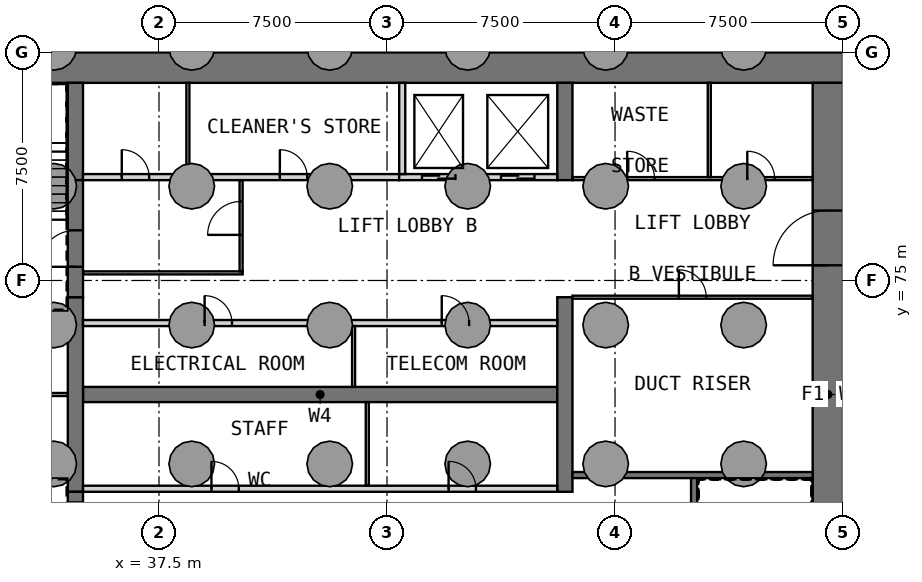
"""IFC4 building model, lengths in metres.
Left out: names, types, materials, properties, quantities, classifications, styles, units other than length and angle.
Written with IfcOpenShell. Run it as: python <this file> out.ifc"""

import sys

from ifc_helpers import new_model, si_unit, direction, frame, frame_2d, origin, place, context, subcontext, project, spatial, rectangle, extrude, element, fill, save


model = new_model("IFC4")
c1 = context("Model", 3, precision=1e-05, world=origin(), true_north=direction((0.0, 1.0)))
c2 = subcontext(c1, "Body", "Model", "MODEL_VIEW")
j1 = project(units=[si_unit("LENGTHUNIT", "METRE"), si_unit("PLANEANGLEUNIT", "RADIAN")], contexts=[c1])
p1 = place(None, origin())
s1 = spatial("IfcSite", under=j1, at=p1, CompositionType="ELEMENT")
p2 = place(p1, origin())
s2 = spatial("IfcBuilding", under=s1, at=p2, CompositionType="ELEMENT")
p3 = place(p2, frame((0.0, 0.0, -12.0)))
s3 = spatial("IfcBuildingStorey", under=s2, at=p3, CompositionType="ELEMENT", Elevation=-12.0)
p4 = place(p3, frame((30.0, 82.0, 0.0), z_axis=(0.0, 0.0, 1.0), x_axis=(1.0, 0.0, 0.0)))
e1 = element("IfcWall", 1, at=p4, inside=s3, PredefinedType="SHEAR", context=c2, shape_type="SweptSolid", body=[
    extrude(rectangle(XDim=30.0, YDim=1.0, at=frame_2d((15.0, 0.0))), origin(), (0.0, 0.0, 1.0), 6.0),
])
p5 = place(p3, frame((59.5, 61.0, 0.0), z_axis=(0.0, 0.0, 1.0), x_axis=(0.0, 1.0, 0.0)))
e2 = element("IfcWall", 2, at=p5, inside=s3, PredefinedType="SHEAR", context=c2, shape_type="SweptSolid", body=[
    extrude(rectangle(XDim=20.5, YDim=1.0, at=frame_2d((10.25, 0.0))), origin(), (0.0, 0.0, 1.0), 6.0),
])
p6 = place(p5, frame((14.5, 0.0, 0.0)))
e3 = element("IfcOpeningElement", 3, at=p6, cuts=e2, PredefinedType="OPENING", context=c2, shape_type="SweptSolid", body=[
    extrude(rectangle(XDim=1.8, YDim=2.1, at=frame_2d((0.9, 1.05))), frame((0.0, 0.51, 0.0), z_axis=(0.0, -1.0, 0.0), x_axis=(1.0, 0.0, 0.0)), (0.0, 0.0, 1.0), 1.02),
])
p7 = place(p3, frame((35.0, 71.25, 0.0), z_axis=(0.0, 0.0, 1.0), x_axis=(1.0, 0.0, 0.0)))
e4 = element("IfcWall", 4, at=p7, inside=s3, PredefinedType="SHEAR", context=c2, shape_type="SweptSolid", body=[
    extrude(rectangle(XDim=15.6, YDim=0.5, at=frame_2d((7.8, 0.0))), origin(), (0.0, 0.0, 1.0), 6.0),
])
p8 = place(p3, frame((34.75, 68.05, 0.0), z_axis=(0.0, 0.0, 1.0), x_axis=(0.0, 1.0, 0.0)))
e5 = element("IfcWall", 5, at=p8, inside=s3, PredefinedType="SHEAR", context=c2, shape_type="SweptSolid", body=[
    extrude(rectangle(XDim=6.4, YDim=0.5, at=frame_2d((3.2, 0.0))), origin(), (0.0, 0.0, 1.0), 6.0),
])
p9 = place(p3, frame((34.75, 78.3, 0.0), z_axis=(0.0, 0.0, 1.0), x_axis=(0.0, 1.0, 0.0)))
e6 = element("IfcWall", 6, at=p9, inside=s3, PredefinedType="SHEAR", context=c2, shape_type="SweptSolid", body=[
    extrude(rectangle(XDim=3.2, YDim=0.5, at=frame_2d((1.6, 0.0))), origin(), (0.0, 0.0, 1.0), 6.0),
])
p10 = place(p3, frame((50.85, 68.05, 0.0), z_axis=(0.0, 0.0, 1.0), x_axis=(0.0, 1.0, 0.0)))
e7 = element("IfcWall", 7, at=p10, inside=s3, PredefinedType="SHEAR", context=c2, shape_type="SweptSolid", body=[
    extrude(rectangle(XDim=6.4, YDim=0.5, at=frame_2d((3.2, 0.0))), origin(), (0.0, 0.0, 1.0), 6.0),
])
p11 = place(p3, frame((50.85, 78.3, 0.0), z_axis=(0.0, 0.0, 1.0), x_axis=(0.0, 1.0, 0.0)))
e8 = element("IfcWall", 8, at=p11, inside=s3, PredefinedType="SHEAR", context=c2, shape_type="SweptSolid", body=[
    extrude(rectangle(XDim=3.2, YDim=0.5, at=frame_2d((1.6, 0.0))), origin(), (0.0, 0.0, 1.0), 6.0),
])
p12 = place(p3, frame((35.0, 68.15, 0.0), z_axis=(0.0, 0.0, 1.0), x_axis=(1.0, 0.0, 0.0)))
e9 = element("IfcWall", 9, at=p12, inside=s3, PredefinedType="PARTITIONING", context=c2, shape_type="SweptSolid", body=[
    extrude(rectangle(XDim=15.6, YDim=0.2, at=frame_2d((7.8, 0.0))), origin(), (0.0, 0.0, 1.0), 5.4),
])
p13 = place(p12, frame((4.225, 0.0, 0.0)))
e10 = element("IfcOpeningElement", 10, at=p13, cuts=e9, PredefinedType="OPENING", context=c2, shape_type="SweptSolid", body=[
    extrude(rectangle(XDim=0.9, YDim=2.1, at=frame_2d((0.45, 1.05))), frame((0.0, 0.11, 0.0), z_axis=(0.0, -1.0, 0.0), x_axis=(1.0, 0.0, 0.0)), (0.0, 0.0, 1.0), 0.22),
])
p14 = place(p12, frame((12.025, 0.0, 0.0)))
e11 = element("IfcOpeningElement", 11, at=p14, cuts=e9, PredefinedType="OPENING", context=c2, shape_type="SweptSolid", body=[
    extrude(rectangle(XDim=0.9, YDim=2.1, at=frame_2d((0.45, 1.05))), frame((0.0, 0.11, 0.0), z_axis=(0.0, -1.0, 0.0), x_axis=(1.0, 0.0, 0.0)), (0.0, 0.0, 1.0), 0.22),
])
p15 = place(p3, frame((44.35, 68.25, 0.0), z_axis=(0.0, 0.0, 1.0), x_axis=(0.0, 1.0, 0.0)))
e12 = element("IfcWall", 12, at=p15, inside=s3, PredefinedType="PARTITIONING", context=c2, shape_type="SweptSolid", body=[
    extrude(rectangle(XDim=2.75, YDim=0.1, at=frame_2d((1.375, 0.0))), origin(), (0.0, 0.0, 1.0), 5.4),
])
p16 = place(p3, frame((35.0, 73.6, 0.0), z_axis=(0.0, 0.0, 1.0), x_axis=(1.0, 0.0, 0.0)))
e13 = element("IfcWall", 13, at=p16, inside=s3, PredefinedType="PARTITIONING", context=c2, shape_type="SweptSolid", body=[
    extrude(rectangle(XDim=15.6, YDim=0.2, at=frame_2d((7.8, 0.0))), origin(), (0.0, 0.0, 1.0), 5.4),
])
p17 = place(p16, frame((4.0, 0.0, 0.0)))
e14 = element("IfcOpeningElement", 14, at=p17, cuts=e13, PredefinedType="OPENING", context=c2, shape_type="SweptSolid", body=[
    extrude(rectangle(XDim=0.9, YDim=2.1, at=frame_2d((0.45, 1.05))), frame((0.0, 0.11, 0.0), z_axis=(0.0, -1.0, 0.0), x_axis=(1.0, 0.0, 0.0)), (0.0, 0.0, 1.0), 0.22),
])
p18 = place(p16, frame((11.8, 0.0, 0.0)))
e15 = element("IfcOpeningElement", 15, at=p18, cuts=e13, PredefinedType="OPENING", context=c2, shape_type="SweptSolid", body=[
    extrude(rectangle(XDim=0.9, YDim=2.1, at=frame_2d((0.45, 1.05))), frame((0.0, 0.11, 0.0), z_axis=(0.0, -1.0, 0.0), x_axis=(1.0, 0.0, 0.0)), (0.0, 0.0, 1.0), 0.22),
])
p19 = place(p3, frame((43.9, 71.5, 0.0), z_axis=(0.0, 0.0, 1.0), x_axis=(0.0, 1.0, 0.0)))
e16 = element("IfcWall", 16, at=p19, inside=s3, PredefinedType="PARTITIONING", context=c2, shape_type="SweptSolid", body=[
    extrude(rectangle(XDim=2.0, YDim=0.1, at=frame_2d((1.0, 0.0))), origin(), (0.0, 0.0, 1.0), 5.4),
])
p20 = place(p3, frame((35.0, 78.4, 0.0), z_axis=(0.0, 0.0, 1.0), x_axis=(1.0, 0.0, 0.0)))
e17 = element("IfcWall", 17, at=p20, inside=s3, PredefinedType="PARTITIONING", context=c2, shape_type="SweptSolid", body=[
    extrude(rectangle(XDim=10.4, YDim=0.2, at=frame_2d((5.2, 0.0))), origin(), (0.0, 0.0, 1.0), 5.4),
])
p21 = place(p20, frame((1.275, 0.0, 0.0)))
e18 = element("IfcOpeningElement", 18, at=p21, cuts=e17, PredefinedType="OPENING", context=c2, shape_type="SweptSolid", body=[
    extrude(rectangle(XDim=0.9, YDim=2.1, at=frame_2d((0.45, 1.05))), frame((0.0, 0.11, 0.0), z_axis=(0.0, -1.0, 0.0), x_axis=(1.0, 0.0, 0.0)), (0.0, 0.0, 1.0), 0.22),
])
p22 = place(p20, frame((6.475, 0.0, 0.0)))
e19 = element("IfcOpeningElement", 19, at=p22, cuts=e17, PredefinedType="OPENING", context=c2, shape_type="SweptSolid", body=[
    extrude(rectangle(XDim=0.9, YDim=2.1, at=frame_2d((0.45, 1.05))), frame((0.0, 0.11, 0.0), z_axis=(0.0, -1.0, 0.0), x_axis=(1.0, 0.0, 0.0)), (0.0, 0.0, 1.0), 0.22),
])
p23 = place(p3, frame((38.45, 78.5, 0.0), z_axis=(0.0, 0.0, 1.0), x_axis=(0.0, 1.0, 0.0)))
e20 = element("IfcWall", 20, at=p23, inside=s3, PredefinedType="PARTITIONING", context=c2, shape_type="SweptSolid", body=[
    extrude(rectangle(XDim=3.0, YDim=0.1, at=frame_2d((1.5, 0.0))), origin(), (0.0, 0.0, 1.0), 5.4),
])
p24 = place(p3, frame((45.4, 78.4, 0.0), z_axis=(0.0, 0.0, 1.0), x_axis=(1.0, 0.0, 0.0)))
e21 = element("IfcWall", 21, at=p24, inside=s3, PredefinedType="SOLIDWALL", context=c2, shape_type="SweptSolid", body=[
    extrude(rectangle(XDim=5.2, YDim=0.2, at=frame_2d((2.6, 0.0))), origin(), (0.0, 0.0, 1.0), 6.0),
])
p25 = place(p24, frame((0.75, 0.0, 0.0)))
e22 = element("IfcOpeningElement", 22, at=p25, cuts=e21, PredefinedType="OPENING", context=c2, shape_type="SweptSolid", body=[
    extrude(rectangle(XDim=1.1, YDim=2.1, at=frame_2d((0.55, 1.05))), frame((0.0, 0.11, 0.0), z_axis=(0.0, -1.0, 0.0), x_axis=(1.0, 0.0, 0.0)), (0.0, 0.0, 1.0), 0.22),
])
p26 = place(p24, frame((3.35, 0.0, 0.0)))
e23 = element("IfcOpeningElement", 23, at=p26, cuts=e21, PredefinedType="OPENING", context=c2, shape_type="SweptSolid", body=[
    extrude(rectangle(XDim=1.1, YDim=2.1, at=frame_2d((0.55, 1.05))), frame((0.0, 0.11, 0.0), z_axis=(0.0, -1.0, 0.0), x_axis=(1.0, 0.0, 0.0)), (0.0, 0.0, 1.0), 0.22),
])
p27 = place(p3, frame((45.5, 78.5, 0.0), z_axis=(0.0, 0.0, 1.0), x_axis=(0.0, 1.0, 0.0)))
e24 = element("IfcWall", 24, at=p27, inside=s3, PredefinedType="SOLIDWALL", context=c2, shape_type="SweptSolid", body=[
    extrude(rectangle(XDim=3.0, YDim=0.2, at=frame_2d((1.5, 0.0))), origin(), (0.0, 0.0, 1.0), 6.0),
])
p28 = place(p3, frame((35.0, 75.25, 0.0), z_axis=(0.0, 0.0, 1.0), x_axis=(1.0, 0.0, 0.0)))
e25 = element("IfcWall", 25, at=p28, inside=s3, PredefinedType="PARTITIONING", context=c2, shape_type="SweptSolid", body=[
    extrude(rectangle(XDim=5.25, YDim=0.1, at=frame_2d((2.625, 0.0))), origin(), (0.0, 0.0, 1.0), 5.4),
])
p29 = place(p3, frame((40.2, 75.3, 0.0), z_axis=(0.0, 0.0, 1.0), x_axis=(0.0, 1.0, 0.0)))
e26 = element("IfcWall", 26, at=p29, inside=s3, PredefinedType="PARTITIONING", context=c2, shape_type="SweptSolid", body=[
    extrude(rectangle(XDim=3.0, YDim=0.1, at=frame_2d((1.5, 0.0))), origin(), (0.0, 0.0, 1.0), 5.4),
])
p30 = place(p29, frame((1.2, 0.0, 0.0)))
e27 = element("IfcOpeningElement", 27, at=p30, cuts=e26, PredefinedType="OPENING", context=c2, shape_type="SweptSolid", body=[
    extrude(rectangle(XDim=1.1, YDim=2.1, at=frame_2d((0.55, 1.05))), frame((0.0, 0.06, 0.0), z_axis=(0.0, -1.0, 0.0), x_axis=(1.0, 0.0, 0.0)), (0.0, 0.0, 1.0), 0.12),
])
p31 = place(p3, frame((34.75, 64.2, 0.0), z_axis=(0.0, 0.0, 1.0), x_axis=(0.0, 1.0, 0.0)))
e28 = element("IfcWall", 28, at=p31, inside=s3, PredefinedType="SOLIDWALL", context=c2, shape_type="SweptSolid", body=[
    extrude(rectangle(XDim=3.85, YDim=0.5, at=frame_2d((1.925, 0.0))), origin(), (0.0, 0.0, 1.0), 4.8),
])
p32 = place(p31, frame((2.3, 0.0, 0.0)))
e29 = element("IfcOpeningElement", 29, at=p32, cuts=e28, PredefinedType="OPENING", context=c2, shape_type="SweptSolid", body=[
    extrude(rectangle(XDim=1.2, YDim=2.1, at=frame_2d((0.6, 1.05))), frame((0.0, 0.26, 0.0), z_axis=(0.0, -1.0, 0.0), x_axis=(1.0, 0.0, 0.0)), (0.0, 0.0, 1.0), 0.52),
])
p33 = place(p3, frame((34.75, 74.45, 0.0), z_axis=(0.0, 0.0, 1.0), x_axis=(0.0, 1.0, 0.0)))
e30 = element("IfcWall", 30, at=p33, inside=s3, PredefinedType="SOLIDWALL", context=c2, shape_type="SweptSolid", body=[
    extrude(rectangle(XDim=3.85, YDim=0.5, at=frame_2d((1.925, 0.0))), origin(), (0.0, 0.0, 1.0), 4.8),
])
p34 = place(p33, frame((1.0, 0.0, 0.0)))
e31 = element("IfcOpeningElement", 31, at=p34, cuts=e30, PredefinedType="OPENING", context=c2, shape_type="SweptSolid", body=[
    extrude(rectangle(XDim=1.2, YDim=2.1, at=frame_2d((0.6, 1.05))), frame((0.0, 0.26, 0.0), z_axis=(0.0, -1.0, 0.0), x_axis=(1.0, 0.0, 0.0)), (0.0, 0.0, 1.0), 0.52),
])
p35 = place(p3, frame((31.0, 68.6, 0.0), z_axis=(0.0, 0.0, 1.0), x_axis=(1.0, 0.0, 0.0)))
e32 = element("IfcWall", 32, at=p35, inside=s3, PredefinedType="SOLIDWALL", context=c2, shape_type="SweptSolid", body=[
    extrude(rectangle(XDim=3.5, YDim=0.2, at=frame_2d((1.75, 0.0))), origin(), (0.0, 0.0, 1.0), 5.4),
])
p36 = place(p35, frame((1.3, 0.0, 0.0)))
e33 = element("IfcOpeningElement", 33, at=p36, cuts=e32, PredefinedType="OPENING", context=c2, shape_type="SweptSolid", body=[
    extrude(rectangle(XDim=0.9, YDim=2.1, at=frame_2d((0.45, 1.05))), frame((0.0, 0.11, 0.0), z_axis=(0.0, -1.0, 0.0), x_axis=(1.0, 0.0, 0.0)), (0.0, 0.0, 1.0), 0.22),
])
p37 = place(p3, frame((31.0, 73.9, 0.0), z_axis=(0.0, 0.0, 1.0), x_axis=(1.0, 0.0, 0.0)))
e34 = element("IfcWall", 34, at=p37, inside=s3, PredefinedType="SOLIDWALL", context=c2, shape_type="SweptSolid", body=[
    extrude(rectangle(XDim=3.5, YDim=0.2, at=frame_2d((1.75, 0.0))), origin(), (0.0, 0.0, 1.0), 5.4),
])
p38 = place(p37, frame((1.3, 0.0, 0.0)))
e35 = element("IfcOpeningElement", 35, at=p38, cuts=e34, PredefinedType="OPENING", context=c2, shape_type="SweptSolid", body=[
    extrude(rectangle(XDim=0.9, YDim=2.1, at=frame_2d((0.45, 1.05))), frame((0.0, 0.11, 0.0), z_axis=(0.0, -1.0, 0.0), x_axis=(1.0, 0.0, 0.0)), (0.0, 0.0, 1.0), 0.22),
])
p39 = place(p3, frame((55.1, 61.0, 0.0), z_axis=(0.0, 0.0, 1.0), x_axis=(0.0, 1.0, 0.0)))
e36 = element("IfcWall", 36, at=p39, inside=s3, PredefinedType="SOLIDWALL", context=c2, shape_type="SweptSolid", body=[
    extrude(rectangle(XDim=7.6, YDim=0.2, at=frame_2d((3.8, 0.0))), origin(), (0.0, 0.0, 1.0), 5.4),
])
p40 = place(p3, frame((51.1, 68.6, 0.0), z_axis=(0.0, 0.0, 1.0), x_axis=(1.0, 0.0, 0.0)))
e37 = element("IfcWall", 37, at=p40, inside=s3, PredefinedType="SOLIDWALL", context=c2, shape_type="SweptSolid", body=[
    extrude(rectangle(XDim=7.9, YDim=0.2, at=frame_2d((3.95, 0.0))), origin(), (0.0, 0.0, 1.0), 5.4),
])
p41 = place(p3, frame((31.0, 71.25, 0.0), z_axis=(0.0, 0.0, 1.0), x_axis=(1.0, 0.0, 0.0)))
e38 = element("IfcWall", 38, at=p41, inside=s3, PredefinedType="PARTITIONING", context=c2, shape_type="SweptSolid", body=[
    extrude(rectangle(XDim=3.5, YDim=0.1, at=frame_2d((1.75, 0.0))), origin(), (0.0, 0.0, 1.0), 5.4),
])
p42 = place(p3, frame((51.1, 74.45, 0.0), z_axis=(0.0, 0.0, 1.0), x_axis=(1.0, 0.0, 0.0)))
e39 = element("IfcWall", 39, at=p42, inside=s3, PredefinedType="PARTITIONING", context=c2, shape_type="SweptSolid", body=[
    extrude(rectangle(XDim=7.9, YDim=0.1, at=frame_2d((3.95, 0.0))), origin(), (0.0, 0.0, 1.0), 5.4),
])
p43 = place(p42, frame((3.5, 0.0, 0.0)))
e40 = element("IfcOpeningElement", 40, at=p43, cuts=e39, PredefinedType="OPENING", context=c2, shape_type="SweptSolid", body=[
    extrude(rectangle(XDim=0.9, YDim=2.1, at=frame_2d((0.45, 1.05))), frame((0.0, 0.06, 0.0), z_axis=(0.0, -1.0, 0.0), x_axis=(1.0, 0.0, 0.0)), (0.0, 0.0, 1.0), 0.12),
])
p44 = place(p3, frame((51.1, 78.35, 0.0), z_axis=(0.0, 0.0, 1.0), x_axis=(1.0, 0.0, 0.0)))
e41 = element("IfcWall", 41, at=p44, inside=s3, PredefinedType="PARTITIONING", context=c2, shape_type="SweptSolid", body=[
    extrude(rectangle(XDim=7.9, YDim=0.1, at=frame_2d((3.95, 0.0))), origin(), (0.0, 0.0, 1.0), 5.4),
])
p45 = place(p44, frame((1.8, 0.0, 0.0)))
e42 = element("IfcOpeningElement", 42, at=p45, cuts=e41, PredefinedType="OPENING", context=c2, shape_type="SweptSolid", body=[
    extrude(rectangle(XDim=0.9, YDim=2.1, at=frame_2d((0.45, 1.05))), frame((0.0, 0.06, 0.0), z_axis=(0.0, -1.0, 0.0), x_axis=(1.0, 0.0, 0.0)), (0.0, 0.0, 1.0), 0.12),
])
p46 = place(p44, frame((5.75, 0.0, 0.0)))
e43 = element("IfcOpeningElement", 43, at=p46, cuts=e41, PredefinedType="OPENING", context=c2, shape_type="SweptSolid", body=[
    extrude(rectangle(XDim=0.9, YDim=2.1, at=frame_2d((0.45, 1.05))), frame((0.0, 0.06, 0.0), z_axis=(0.0, -1.0, 0.0), x_axis=(1.0, 0.0, 0.0)), (0.0, 0.0, 1.0), 0.12),
])
p47 = place(p3, frame((55.6, 78.4, 0.0), z_axis=(0.0, 0.0, 1.0), x_axis=(0.0, 1.0, 0.0)))
e44 = element("IfcWall", 44, at=p47, inside=s3, PredefinedType="PARTITIONING", context=c2, shape_type="SweptSolid", body=[
    extrude(rectangle(XDim=3.1, YDim=0.1, at=frame_2d((1.55, 0.0))), origin(), (0.0, 0.0, 1.0), 5.4),
])
p48 = place(p13, origin())
e45 = element("IfcDoor", 45, at=p48, inside=s3, OperationType="SINGLE_SWING_RIGHT", PredefinedType="DOOR", context=c2, shape_type="SweptSolid", body=[
    extrude(rectangle(XDim=0.9, YDim=2.1, at=frame_2d((0.45, 1.05))), frame((0.0, 0.025, 0.0), z_axis=(0.0, -1.0, 0.0), x_axis=(1.0, 0.0, 0.0)), (0.0, 0.0, 1.0), 0.05),
])
fill(e10, e45)
p49 = place(p14, origin())
e46 = element("IfcDoor", 46, at=p49, inside=s3, OperationType="SINGLE_SWING_LEFT", PredefinedType="DOOR", context=c2, shape_type="SweptSolid", body=[
    extrude(rectangle(XDim=0.9, YDim=2.1, at=frame_2d((0.45, 1.05))), frame((0.0, 0.025, 0.0), z_axis=(0.0, -1.0, 0.0), x_axis=(1.0, 0.0, 0.0)), (0.0, 0.0, 1.0), 0.05),
])
fill(e11, e46)
p50 = place(p17, origin())
e47 = element("IfcDoor", 47, at=p50, inside=s3, OperationType="SINGLE_SWING_RIGHT", PredefinedType="DOOR", context=c2, shape_type="SweptSolid", body=[
    extrude(rectangle(XDim=0.9, YDim=2.1, at=frame_2d((0.45, 1.05))), frame((0.0, 0.025, 0.0), z_axis=(0.0, -1.0, 0.0), x_axis=(1.0, 0.0, 0.0)), (0.0, 0.0, 1.0), 0.05),
])
fill(e14, e47)
p51 = place(p18, origin())
e48 = element("IfcDoor", 48, at=p51, inside=s3, OperationType="SINGLE_SWING_LEFT", PredefinedType="DOOR", context=c2, shape_type="SweptSolid", body=[
    extrude(rectangle(XDim=0.9, YDim=2.1, at=frame_2d((0.45, 1.05))), frame((0.0, 0.025, 0.0), z_axis=(0.0, -1.0, 0.0), x_axis=(1.0, 0.0, 0.0)), (0.0, 0.0, 1.0), 0.05),
])
fill(e15, e48)
p52 = place(p21, origin())
e49 = element("IfcDoor", 49, at=p52, inside=s3, OperationType="SINGLE_SWING_RIGHT", PredefinedType="DOOR", context=c2, shape_type="SweptSolid", body=[
    extrude(rectangle(XDim=0.9, YDim=2.1, at=frame_2d((0.45, 1.05))), frame((0.0, 0.025, 0.0), z_axis=(0.0, -1.0, 0.0), x_axis=(1.0, 0.0, 0.0)), (0.0, 0.0, 1.0), 0.05),
])
fill(e18, e49)
p53 = place(p22, origin())
e50 = element("IfcDoor", 50, at=p53, inside=s3, OperationType="SINGLE_SWING_LEFT", PredefinedType="DOOR", context=c2, shape_type="SweptSolid", body=[
    extrude(rectangle(XDim=0.9, YDim=2.1, at=frame_2d((0.45, 1.05))), frame((0.0, 0.025, 0.0), z_axis=(0.0, -1.0, 0.0), x_axis=(1.0, 0.0, 0.0)), (0.0, 0.0, 1.0), 0.05),
])
fill(e19, e50)
p54 = place(p25, origin())
e51 = element("IfcDoor", 51, at=p54, inside=s3, OperationType="DOUBLE_DOOR_SLIDING", PredefinedType="DOOR", context=c2, shape_type="SweptSolid", body=[
    extrude(rectangle(XDim=1.1, YDim=2.1, at=frame_2d((0.55, 1.05))), frame((0.0, 0.025, 0.0), z_axis=(0.0, -1.0, 0.0), x_axis=(1.0, 0.0, 0.0)), (0.0, 0.0, 1.0), 0.05),
])
fill(e22, e51)
p55 = place(p26, origin())
e52 = element("IfcDoor", 52, at=p55, inside=s3, OperationType="DOUBLE_DOOR_SLIDING", PredefinedType="DOOR", context=c2, shape_type="SweptSolid", body=[
    extrude(rectangle(XDim=1.1, YDim=2.1, at=frame_2d((0.55, 1.05))), frame((0.0, 0.025, 0.0), z_axis=(0.0, -1.0, 0.0), x_axis=(1.0, 0.0, 0.0)), (0.0, 0.0, 1.0), 0.05),
])
fill(e23, e52)
p56 = place(p6, origin())
e53 = element("IfcDoor", 53, at=p56, inside=s3, OperationType="DOUBLE_DOOR_SINGLE_SWING", PredefinedType="DOOR", context=c2, shape_type="SweptSolid", body=[
    extrude(rectangle(XDim=1.8, YDim=2.1, at=frame_2d((0.9, 1.05))), frame((0.0, 0.025, 0.0), z_axis=(0.0, -1.0, 0.0), x_axis=(1.0, 0.0, 0.0)), (0.0, 0.0, 1.0), 0.05),
])
fill(e3, e53)
p57 = place(p30, origin())
e54 = element("IfcDoor", 54, at=p57, inside=s3, OperationType="SINGLE_SWING_LEFT", PredefinedType="DOOR", context=c2, shape_type="SweptSolid", body=[
    extrude(rectangle(XDim=1.1, YDim=2.1, at=frame_2d((0.55, 1.05))), frame((0.0, 0.025, 0.0), z_axis=(0.0, -1.0, 0.0), x_axis=(1.0, 0.0, 0.0)), (0.0, 0.0, 1.0), 0.05),
])
fill(e27, e54)
p58 = place(p32, origin())
e55 = element("IfcDoor", 55, at=p58, inside=s3, OperationType="SINGLE_SWING_LEFT", PredefinedType="DOOR", context=c2, shape_type="SweptSolid", body=[
    extrude(rectangle(XDim=1.2, YDim=2.1, at=frame_2d((0.6, 1.05))), frame((0.0, 0.025, 0.0), z_axis=(0.0, -1.0, 0.0), x_axis=(1.0, 0.0, 0.0)), (0.0, 0.0, 1.0), 0.05),
])
fill(e29, e55)
p59 = place(p34, origin())
e56 = element("IfcDoor", 56, at=p59, inside=s3, OperationType="SINGLE_SWING_RIGHT", PredefinedType="DOOR", context=c2, shape_type="SweptSolid", body=[
    extrude(rectangle(XDim=1.2, YDim=2.1, at=frame_2d((0.6, 1.05))), frame((0.0, 0.025, 0.0), z_axis=(0.0, -1.0, 0.0), x_axis=(1.0, 0.0, 0.0)), (0.0, 0.0, 1.0), 0.05),
])
fill(e31, e56)
p60 = place(p43, origin())
e57 = element("IfcDoor", 57, at=p60, inside=s3, OperationType="SINGLE_SWING_RIGHT", PredefinedType="DOOR", context=c2, shape_type="SweptSolid", body=[
    extrude(rectangle(XDim=0.9, YDim=2.1, at=frame_2d((0.45, 1.05))), frame((0.0, 0.025, 0.0), z_axis=(0.0, -1.0, 0.0), x_axis=(1.0, 0.0, 0.0)), (0.0, 0.0, 1.0), 0.05),
])
fill(e40, e57)
p61 = place(p45, origin())
e58 = element("IfcDoor", 58, at=p61, inside=s3, OperationType="SINGLE_SWING_RIGHT", PredefinedType="DOOR", context=c2, shape_type="SweptSolid", body=[
    extrude(rectangle(XDim=0.9, YDim=2.1, at=frame_2d((0.45, 1.05))), frame((0.0, 0.025, 0.0), z_axis=(0.0, -1.0, 0.0), x_axis=(1.0, 0.0, 0.0)), (0.0, 0.0, 1.0), 0.05),
])
fill(e42, e58)
p62 = place(p46, origin())
e59 = element("IfcDoor", 59, at=p62, inside=s3, OperationType="SINGLE_SWING_LEFT", PredefinedType="DOOR", context=c2, shape_type="SweptSolid", body=[
    extrude(rectangle(XDim=0.9, YDim=2.1, at=frame_2d((0.45, 1.05))), frame((0.0, 0.025, 0.0), z_axis=(0.0, -1.0, 0.0), x_axis=(1.0, 0.0, 0.0)), (0.0, 0.0, 1.0), 0.05),
])
fill(e43, e59)
save(model, sys.argv[1])
